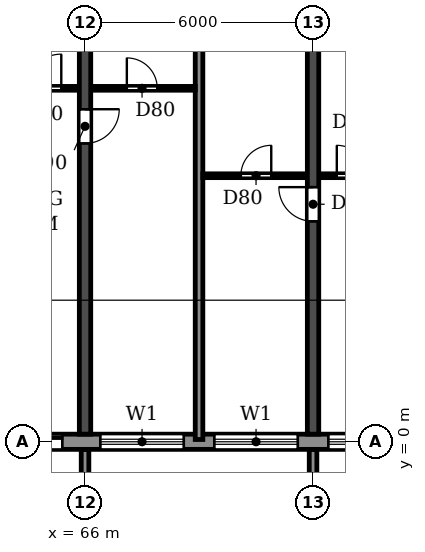
"""IFC4 building model, lengths in metres.
Left out: names, types, materials, properties, quantities, classifications, styles, units other than length and angle.
Written with IfcOpenShell. Run it as: python <this file> out.ifc"""

import sys

from ifc_helpers import new_model, si_unit, direction, frame, frame_2d, origin, place, context, subcontext, project, spatial, polyline, rectangle, outline, extrude, source, transform, mapped, element, fill, save


model = new_model("IFC4")
c1 = context("Model", 3, precision=1e-05, world=origin(), true_north=direction((0.0, 1.0)))
c2 = subcontext(c1, "Body", "Model", "MODEL_VIEW")
j1 = project(units=[si_unit("LENGTHUNIT", "METRE"), si_unit("PLANEANGLEUNIT", "RADIAN")], contexts=[c1])
p1 = place(None, origin())
s1 = spatial("IfcSite", under=j1, at=p1, CompositionType="ELEMENT")
p2 = place(p1, origin())
s2 = spatial("IfcBuilding", under=s1, at=p2, CompositionType="ELEMENT")
p3 = place(p2, frame((0.0, 0.0, 132.3)))
s3 = spatial("IfcBuildingStorey", under=s2, at=p3, CompositionType="ELEMENT", Elevation=132.3)
p4 = place(p3, frame((66.0, 0.2, 0.0), z_axis=(0.0, 0.0, 1.0), x_axis=(0.0, 1.0, 0.0)))
e1 = element("IfcWall", 1, at=p4, inside=s3, PredefinedType="SHEAR", context=c2, shape_type="SweptSolid", body=[
    extrude(rectangle(XDim=11.675, YDim=0.3, at=frame_2d((5.837, 0.0))), origin(), (0.0, 0.0, 1.0), 3.07),
])
p5 = place(p4, frame((7.65, 0.0, 0.0)))
e2 = element("IfcOpeningElement", 2, at=p5, cuts=e1, PredefinedType="OPENING", context=c2, shape_type="SweptSolid", body=[
    extrude(rectangle(XDim=0.9, YDim=2.1, at=frame_2d((0.45, 1.05))), frame((0.0, 0.16, 0.0), z_axis=(0.0, -1.0, 0.0), x_axis=(1.0, 0.0, 0.0)), (0.0, 0.0, 1.0), 0.32),
])
p6 = place(p3, frame((72.0, 0.2, 0.0), z_axis=(0.0, 0.0, 1.0), x_axis=(0.0, 1.0, 0.0)))
e3 = element("IfcWall", 3, at=p6, inside=s3, PredefinedType="SHEAR", context=c2, shape_type="SweptSolid", body=[
    extrude(rectangle(XDim=11.675, YDim=0.3, at=frame_2d((5.837, 0.0))), origin(), (0.0, 0.0, 1.0), 3.07),
])
p7 = place(p6, frame((5.6, 0.0, 0.0)))
e4 = element("IfcOpeningElement", 4, at=p7, cuts=e3, PredefinedType="OPENING", context=c2, shape_type="SweptSolid", body=[
    extrude(rectangle(XDim=0.9, YDim=2.1, at=frame_2d((0.45, 1.05))), frame((0.0, 0.16, 0.0), z_axis=(0.0, -1.0, 0.0), x_axis=(1.0, 0.0, 0.0)), (0.0, 0.0, 1.0), 0.32),
])
p8 = place(p3, frame((16.683, 0.0, 0.0), z_axis=(0.0, 0.0, 1.0), x_axis=(1.0, 0.0, 0.0)))
e5 = element("IfcWall", 5, at=p8, inside=s3, PredefinedType="STANDARD", context=c2, shape_type="SweptSolid", body=[
    extrude(rectangle(XDim=68.634, YDim=0.4, at=frame_2d((34.317, 0.0))), origin(), (0.0, 0.0, 1.0), 3.07),
])
p9 = place(p8, frame((1.717, 0.0, 0.9)))
e6 = element("IfcOpeningElement", 6, at=p9, cuts=e5, PredefinedType="OPENING", context=c2, shape_type="SweptSolid", body=[
    extrude(rectangle(XDim=2.2, YDim=1.5, at=frame_2d((1.1, 0.75))), frame((0.0, 0.21, 0.0), z_axis=(0.0, -1.0, 0.0), x_axis=(1.0, 0.0, 0.0)), (0.0, 0.0, 1.0), 0.42),
])
p10 = place(p8, frame((4.717, 0.0, 0.9)))
e7 = element("IfcOpeningElement", 7, at=p10, cuts=e5, PredefinedType="OPENING", context=c2, shape_type="SweptSolid", body=[
    extrude(rectangle(XDim=2.2, YDim=1.5, at=frame_2d((1.1, 0.75))), frame((0.0, 0.21, 0.0), z_axis=(0.0, -1.0, 0.0), x_axis=(1.0, 0.0, 0.0)), (0.0, 0.0, 1.0), 0.42),
])
p11 = place(p8, frame((7.717, 0.0, 0.9)))
e8 = element("IfcOpeningElement", 8, at=p11, cuts=e5, PredefinedType="OPENING", context=c2, shape_type="SweptSolid", body=[
    extrude(rectangle(XDim=2.2, YDim=1.5, at=frame_2d((1.1, 0.75))), frame((0.0, 0.21, 0.0), z_axis=(0.0, -1.0, 0.0), x_axis=(1.0, 0.0, 0.0)), (0.0, 0.0, 1.0), 0.42),
])
p12 = place(p8, frame((10.917, 0.0, 0.0)))
e9 = element("IfcOpeningElement", 9, at=p12, cuts=e5, PredefinedType="OPENING", context=c2, shape_type="SweptSolid", body=[
    extrude(rectangle(XDim=1.8, YDim=2.4, at=frame_2d((0.9, 1.2))), frame((0.0, 0.21, 0.0), z_axis=(0.0, -1.0, 0.0), x_axis=(1.0, 0.0, 0.0)), (0.0, 0.0, 1.0), 0.42),
])
p13 = place(p8, frame((13.717, 0.0, 0.9)))
e10 = element("IfcOpeningElement", 10, at=p13, cuts=e5, PredefinedType="OPENING", context=c2, shape_type="SweptSolid", body=[
    extrude(rectangle(XDim=2.2, YDim=1.5, at=frame_2d((1.1, 0.75))), frame((0.0, 0.21, 0.0), z_axis=(0.0, -1.0, 0.0), x_axis=(1.0, 0.0, 0.0)), (0.0, 0.0, 1.0), 0.42),
])
p14 = place(p8, frame((16.717, 0.0, 0.9)))
e11 = element("IfcOpeningElement", 11, at=p14, cuts=e5, PredefinedType="OPENING", context=c2, shape_type="SweptSolid", body=[
    extrude(rectangle(XDim=2.2, YDim=1.5, at=frame_2d((1.1, 0.75))), frame((0.0, 0.21, 0.0), z_axis=(0.0, -1.0, 0.0), x_axis=(1.0, 0.0, 0.0)), (0.0, 0.0, 1.0), 0.42),
])
p15 = place(p8, frame((19.917, 0.0, 0.0)))
e12 = element("IfcOpeningElement", 12, at=p15, cuts=e5, PredefinedType="OPENING", context=c2, shape_type="SweptSolid", body=[
    extrude(rectangle(XDim=1.8, YDim=2.4, at=frame_2d((0.9, 1.2))), frame((0.0, 0.21, 0.0), z_axis=(0.0, -1.0, 0.0), x_axis=(1.0, 0.0, 0.0)), (0.0, 0.0, 1.0), 0.42),
])
p16 = place(p8, frame((22.717, 0.0, 0.9)))
e13 = element("IfcOpeningElement", 13, at=p16, cuts=e5, PredefinedType="OPENING", context=c2, shape_type="SweptSolid", body=[
    extrude(rectangle(XDim=2.2, YDim=1.5, at=frame_2d((1.1, 0.75))), frame((0.0, 0.21, 0.0), z_axis=(0.0, -1.0, 0.0), x_axis=(1.0, 0.0, 0.0)), (0.0, 0.0, 1.0), 0.42),
])
p17 = place(p8, frame((25.717, 0.0, 0.9)))
e14 = element("IfcOpeningElement", 14, at=p17, cuts=e5, PredefinedType="OPENING", context=c2, shape_type="SweptSolid", body=[
    extrude(rectangle(XDim=2.2, YDim=1.5, at=frame_2d((1.1, 0.75))), frame((0.0, 0.21, 0.0), z_axis=(0.0, -1.0, 0.0), x_axis=(1.0, 0.0, 0.0)), (0.0, 0.0, 1.0), 0.42),
])
p18 = place(p8, frame((28.717, 0.0, 0.9)))
e15 = element("IfcOpeningElement", 15, at=p18, cuts=e5, PredefinedType="OPENING", context=c2, shape_type="SweptSolid", body=[
    extrude(rectangle(XDim=2.2, YDim=1.5, at=frame_2d((1.1, 0.75))), frame((0.0, 0.21, 0.0), z_axis=(0.0, -1.0, 0.0), x_axis=(1.0, 0.0, 0.0)), (0.0, 0.0, 1.0), 0.42),
])
p19 = place(p8, frame((31.917, 0.0, 0.0)))
e16 = element("IfcOpeningElement", 16, at=p19, cuts=e5, PredefinedType="OPENING", context=c2, shape_type="SweptSolid", body=[
    extrude(rectangle(XDim=1.8, YDim=2.4, at=frame_2d((0.9, 1.2))), frame((0.0, 0.21, 0.0), z_axis=(0.0, -1.0, 0.0), x_axis=(1.0, 0.0, 0.0)), (0.0, 0.0, 1.0), 0.42),
])
p20 = place(p8, frame((34.717, 0.0, 0.9)))
e17 = element("IfcOpeningElement", 17, at=p20, cuts=e5, PredefinedType="OPENING", context=c2, shape_type="SweptSolid", body=[
    extrude(rectangle(XDim=2.2, YDim=1.5, at=frame_2d((1.1, 0.75))), frame((0.0, 0.21, 0.0), z_axis=(0.0, -1.0, 0.0), x_axis=(1.0, 0.0, 0.0)), (0.0, 0.0, 1.0), 0.42),
])
p21 = place(p8, frame((37.717, 0.0, 0.9)))
e18 = element("IfcOpeningElement", 18, at=p21, cuts=e5, PredefinedType="OPENING", context=c2, shape_type="SweptSolid", body=[
    extrude(rectangle(XDim=2.2, YDim=1.5, at=frame_2d((1.1, 0.75))), frame((0.0, 0.21, 0.0), z_axis=(0.0, -1.0, 0.0), x_axis=(1.0, 0.0, 0.0)), (0.0, 0.0, 1.0), 0.42),
])
p22 = place(p8, frame((40.717, 0.0, 0.9)))
e19 = element("IfcOpeningElement", 19, at=p22, cuts=e5, PredefinedType="OPENING", context=c2, shape_type="SweptSolid", body=[
    extrude(rectangle(XDim=2.2, YDim=1.5, at=frame_2d((1.1, 0.75))), frame((0.0, 0.21, 0.0), z_axis=(0.0, -1.0, 0.0), x_axis=(1.0, 0.0, 0.0)), (0.0, 0.0, 1.0), 0.42),
])
p23 = place(p8, frame((43.717, 0.0, 0.9)))
e20 = element("IfcOpeningElement", 20, at=p23, cuts=e5, PredefinedType="OPENING", context=c2, shape_type="SweptSolid", body=[
    extrude(rectangle(XDim=2.2, YDim=1.5, at=frame_2d((1.1, 0.75))), frame((0.0, 0.21, 0.0), z_axis=(0.0, -1.0, 0.0), x_axis=(1.0, 0.0, 0.0)), (0.0, 0.0, 1.0), 0.42),
])
p24 = place(p8, frame((46.917, 0.0, 0.0)))
e21 = element("IfcOpeningElement", 21, at=p24, cuts=e5, PredefinedType="OPENING", context=c2, shape_type="SweptSolid", body=[
    extrude(rectangle(XDim=1.8, YDim=2.4, at=frame_2d((0.9, 1.2))), frame((0.0, 0.21, 0.0), z_axis=(0.0, -1.0, 0.0), x_axis=(1.0, 0.0, 0.0)), (0.0, 0.0, 1.0), 0.42),
])
p25 = place(p8, frame((49.717, 0.0, 0.9)))
e22 = element("IfcOpeningElement", 22, at=p25, cuts=e5, PredefinedType="OPENING", context=c2, shape_type="SweptSolid", body=[
    extrude(rectangle(XDim=2.2, YDim=1.5, at=frame_2d((1.1, 0.75))), frame((0.0, 0.21, 0.0), z_axis=(0.0, -1.0, 0.0), x_axis=(1.0, 0.0, 0.0)), (0.0, 0.0, 1.0), 0.42),
])
p26 = place(p8, frame((52.717, 0.0, 0.9)))
e23 = element("IfcOpeningElement", 23, at=p26, cuts=e5, PredefinedType="OPENING", context=c2, shape_type="SweptSolid", body=[
    extrude(rectangle(XDim=2.2, YDim=1.5, at=frame_2d((1.1, 0.75))), frame((0.0, 0.21, 0.0), z_axis=(0.0, -1.0, 0.0), x_axis=(1.0, 0.0, 0.0)), (0.0, 0.0, 1.0), 0.42),
])
p27 = place(p8, frame((55.717, 0.0, 0.9)))
e24 = element("IfcOpeningElement", 24, at=p27, cuts=e5, PredefinedType="OPENING", context=c2, shape_type="SweptSolid", body=[
    extrude(rectangle(XDim=2.2, YDim=1.5, at=frame_2d((1.1, 0.75))), frame((0.0, 0.21, 0.0), z_axis=(0.0, -1.0, 0.0), x_axis=(1.0, 0.0, 0.0)), (0.0, 0.0, 1.0), 0.42),
])
p28 = place(p8, frame((58.917, 0.0, 0.0)))
e25 = element("IfcOpeningElement", 25, at=p28, cuts=e5, PredefinedType="OPENING", context=c2, shape_type="SweptSolid", body=[
    extrude(rectangle(XDim=1.8, YDim=2.4, at=frame_2d((0.9, 1.2))), frame((0.0, 0.21, 0.0), z_axis=(0.0, -1.0, 0.0), x_axis=(1.0, 0.0, 0.0)), (0.0, 0.0, 1.0), 0.42),
])
p29 = place(p8, frame((61.717, 0.0, 0.9)))
e26 = element("IfcOpeningElement", 26, at=p29, cuts=e5, PredefinedType="OPENING", context=c2, shape_type="SweptSolid", body=[
    extrude(rectangle(XDim=2.2, YDim=1.5, at=frame_2d((1.1, 0.75))), frame((0.0, 0.21, 0.0), z_axis=(0.0, -1.0, 0.0), x_axis=(1.0, 0.0, 0.0)), (0.0, 0.0, 1.0), 0.42),
])
p30 = place(p8, frame((64.717, 0.0, 0.9)))
e27 = element("IfcOpeningElement", 27, at=p30, cuts=e5, PredefinedType="OPENING", context=c2, shape_type="SweptSolid", body=[
    extrude(rectangle(XDim=2.2, YDim=1.5, at=frame_2d((1.1, 0.75))), frame((0.0, 0.21, 0.0), z_axis=(0.0, -1.0, 0.0), x_axis=(1.0, 0.0, 0.0)), (0.0, 0.0, 1.0), 0.42),
])
m1 = source(origin(), c2, "Body", "SweptSolid", [
    extrude(outline(polyline([(0.0, 0.0), (0.2, 0.0), (0.2, 1.65), (0.0, 1.65), (0.0, 0.0)])), origin(), (0.0, 0.0, 1.0), 3.1),
])
for number, where in (
    (28, (65.9, -1.85, 0.0)),
    (29, (71.9, -1.85, 0.0)),
):
    element("IfcWall", number, at=place(p3, frame(where)), inside=s3, PredefinedType="STANDARD", context=c2, shape_type="MappedRepresentation", body=[
        mapped(m1, transform((0.0, 0.0, 0.0))),
    ])
p31 = place(p3, frame((69.0, 0.06, 0.0), z_axis=(0.0, 0.0, 1.0), x_axis=(0.0, 1.0, 0.0)))
e30 = element("IfcWall", 30, at=p31, inside=s3, PredefinedType="PARTITIONING", context=c2, shape_type="SweptSolid", body=[
    extrude(rectangle(XDim=11.805, YDim=0.2, at=frame_2d((5.902, 0.0))), origin(), (0.0, 0.0, 1.0), 3.07),
])
p32 = place(p3, frame((69.1, 7.0, 0.0), z_axis=(0.0, 0.0, 1.0), x_axis=(1.0, 0.0, 0.0)))
e31 = element("IfcWall", 31, at=p32, inside=s3, PredefinedType="PARTITIONING", context=c2, shape_type="SweptSolid", body=[
    extrude(rectangle(XDim=2.74, YDim=0.1, at=frame_2d((1.37, 0.0))), origin(), (0.0, 0.0, 1.0), 3.07),
])
p33 = place(p32, frame((1.0, 0.0, 0.0)))
e32 = element("IfcOpeningElement", 32, at=p33, cuts=e31, PredefinedType="OPENING", context=c2, shape_type="SweptSolid", body=[
    extrude(rectangle(XDim=0.8, YDim=2.1, at=frame_2d((0.4, 1.05))), frame((0.0, 0.06, 0.0), z_axis=(0.0, -1.0, 0.0), x_axis=(1.0, 0.0, 0.0)), (0.0, 0.0, 1.0), 0.12),
])
p34 = place(p3, frame((72.16, 7.0, 0.0), z_axis=(0.0, 0.0, 1.0), x_axis=(1.0, 0.0, 0.0)))
e33 = element("IfcWall", 33, at=p34, inside=s3, PredefinedType="PARTITIONING", context=c2, shape_type="SweptSolid", body=[
    extrude(rectangle(XDim=1.94, YDim=0.1, at=frame_2d((0.97, 0.0))), origin(), (0.0, 0.0, 1.0), 3.07),
])
p35 = place(p34, frame((0.465, 0.0, 0.0)))
e34 = element("IfcOpeningElement", 34, at=p35, cuts=e33, PredefinedType="OPENING", context=c2, shape_type="SweptSolid", body=[
    extrude(rectangle(XDim=0.8, YDim=2.1, at=frame_2d((0.4, 1.05))), frame((0.0, 0.06, 0.0), z_axis=(0.0, -1.0, 0.0), x_axis=(1.0, 0.0, 0.0)), (0.0, 0.0, 1.0), 0.12),
])
p36 = place(p3, frame((63.8, 9.3, 0.0), z_axis=(0.0, 0.0, 1.0), x_axis=(1.0, 0.0, 0.0)))
e35 = element("IfcWall", 35, at=p36, inside=s3, PredefinedType="PARTITIONING", context=c2, shape_type="SweptSolid", body=[
    extrude(rectangle(XDim=2.04, YDim=0.1, at=frame_2d((1.02, 0.0))), origin(), (0.0, 0.0, 1.0), 3.07),
])
p37 = place(p36, frame((0.675, 0.0, 0.0)))
e36 = element("IfcOpeningElement", 36, at=p37, cuts=e35, PredefinedType="OPENING", context=c2, shape_type="SweptSolid", body=[
    extrude(rectangle(XDim=0.9, YDim=2.1, at=frame_2d((0.45, 1.05))), frame((0.0, 0.06, 0.0), z_axis=(0.0, -1.0, 0.0), x_axis=(1.0, 0.0, 0.0)), (0.0, 0.0, 1.0), 0.12),
])
p38 = place(p3, frame((66.16, 9.3, 0.0), z_axis=(0.0, 0.0, 1.0), x_axis=(1.0, 0.0, 0.0)))
e37 = element("IfcWall", 37, at=p38, inside=s3, PredefinedType="PARTITIONING", context=c2, shape_type="SweptSolid", body=[
    extrude(rectangle(XDim=2.74, YDim=0.1, at=frame_2d((1.37, 0.0))), origin(), (0.0, 0.0, 1.0), 3.07),
])
p39 = place(p38, frame((0.94, 0.0, 0.0)))
e38 = element("IfcOpeningElement", 38, at=p39, cuts=e37, PredefinedType="OPENING", context=c2, shape_type="SweptSolid", body=[
    extrude(rectangle(XDim=0.8, YDim=2.1, at=frame_2d((0.4, 1.05))), frame((0.0, 0.06, 0.0), z_axis=(0.0, -1.0, 0.0), x_axis=(1.0, 0.0, 0.0)), (0.0, 0.0, 1.0), 0.12),
])
p40 = place(p24, origin())
e39 = element("IfcDoor", 39, at=p40, inside=s3, OperationType="DOUBLE_DOOR_SLIDING", PredefinedType="DOOR", context=c2, shape_type="SweptSolid", body=[
    extrude(rectangle(XDim=1.8, YDim=2.4, at=frame_2d((0.9, 1.2))), frame((0.0, 0.025, 0.0), z_axis=(0.0, -1.0, 0.0), x_axis=(1.0, 0.0, 0.0)), (0.0, 0.0, 1.0), 0.05),
])
fill(e21, e39)
p41 = place(p25, origin())
e40 = element("IfcWindow", 40, at=p41, inside=s3, PartitioningType="DOUBLE_PANEL_HORIZONTAL", PredefinedType="WINDOW", context=c2, shape_type="SweptSolid", body=[
    extrude(rectangle(XDim=2.2, YDim=1.5, at=frame_2d((1.1, 0.75))), frame((0.0, 0.03, 0.0), z_axis=(0.0, -1.0, 0.0), x_axis=(1.0, 0.0, 0.0)), (0.0, 0.0, 1.0), 0.06),
])
fill(e22, e40)
p42 = place(p26, origin())
e41 = element("IfcWindow", 41, at=p42, inside=s3, PartitioningType="DOUBLE_PANEL_HORIZONTAL", PredefinedType="WINDOW", context=c2, shape_type="SweptSolid", body=[
    extrude(rectangle(XDim=2.2, YDim=1.5, at=frame_2d((1.1, 0.75))), frame((0.0, 0.03, 0.0), z_axis=(0.0, -1.0, 0.0), x_axis=(1.0, 0.0, 0.0)), (0.0, 0.0, 1.0), 0.06),
])
fill(e23, e41)
p43 = place(p27, origin())
e42 = element("IfcWindow", 42, at=p43, inside=s3, PartitioningType="DOUBLE_PANEL_HORIZONTAL", PredefinedType="WINDOW", context=c2, shape_type="SweptSolid", body=[
    extrude(rectangle(XDim=2.2, YDim=1.5, at=frame_2d((1.1, 0.75))), frame((0.0, 0.03, 0.0), z_axis=(0.0, -1.0, 0.0), x_axis=(1.0, 0.0, 0.0)), (0.0, 0.0, 1.0), 0.06),
])
fill(e24, e42)
p44 = place(p39, origin())
e43 = element("IfcDoor", 43, at=p44, inside=s3, OperationType="SINGLE_SWING_LEFT", PredefinedType="DOOR", context=c2, shape_type="SweptSolid", body=[
    extrude(rectangle(XDim=0.8, YDim=2.1, at=frame_2d((0.4, 1.05))), frame((0.0, 0.025, 0.0), z_axis=(0.0, -1.0, 0.0), x_axis=(1.0, 0.0, 0.0)), (0.0, 0.0, 1.0), 0.05),
])
fill(e38, e43)
p45 = place(p37, origin())
e44 = element("IfcDoor", 44, at=p45, inside=s3, OperationType="SINGLE_SWING_RIGHT", PredefinedType="DOOR", context=c2, shape_type="SweptSolid", body=[
    extrude(rectangle(XDim=0.9, YDim=2.1, at=frame_2d((0.45, 1.05))), frame((0.0, 0.025, 0.0), z_axis=(0.0, -1.0, 0.0), x_axis=(1.0, 0.0, 0.0)), (0.0, 0.0, 1.0), 0.05),
])
fill(e36, e44)
p46 = place(p5, frame((0.9, 0.0, 0.0), z_axis=(0.0, 0.0, 1.0), x_axis=(-1.0, 0.0, 0.0)))
e45 = element("IfcDoor", 45, at=p46, inside=s3, OperationType="SINGLE_SWING_LEFT", PredefinedType="DOOR", context=c2, shape_type="SweptSolid", body=[
    extrude(rectangle(XDim=0.9, YDim=2.1, at=frame_2d((0.45, 1.05))), frame((0.0, 0.025, 0.0), z_axis=(0.0, -1.0, 0.0), x_axis=(1.0, 0.0, 0.0)), (0.0, 0.0, 1.0), 0.05),
])
fill(e2, e45)
p47 = place(p33, origin())
e46 = element("IfcDoor", 46, at=p47, inside=s3, OperationType="SINGLE_SWING_RIGHT", PredefinedType="DOOR", context=c2, shape_type="SweptSolid", body=[
    extrude(rectangle(XDim=0.8, YDim=2.1, at=frame_2d((0.4, 1.05))), frame((0.0, 0.025, 0.0), z_axis=(0.0, -1.0, 0.0), x_axis=(1.0, 0.0, 0.0)), (0.0, 0.0, 1.0), 0.05),
])
fill(e32, e46)
p48 = place(p7, origin())
e47 = element("IfcDoor", 47, at=p48, inside=s3, OperationType="SINGLE_SWING_RIGHT", PredefinedType="DOOR", context=c2, shape_type="SweptSolid", body=[
    extrude(rectangle(XDim=0.9, YDim=2.1, at=frame_2d((0.45, 1.05))), frame((0.0, 0.025, 0.0), z_axis=(0.0, -1.0, 0.0), x_axis=(1.0, 0.0, 0.0)), (0.0, 0.0, 1.0), 0.05),
])
fill(e4, e47)
p49 = place(p35, origin())
e48 = element("IfcDoor", 48, at=p49, inside=s3, OperationType="SINGLE_SWING_LEFT", PredefinedType="DOOR", context=c2, shape_type="SweptSolid", body=[
    extrude(rectangle(XDim=0.8, YDim=2.1, at=frame_2d((0.4, 1.05))), frame((0.0, 0.025, 0.0), z_axis=(0.0, -1.0, 0.0), x_axis=(1.0, 0.0, 0.0)), (0.0, 0.0, 1.0), 0.05),
])
fill(e34, e48)
save(model, sys.argv[1])
